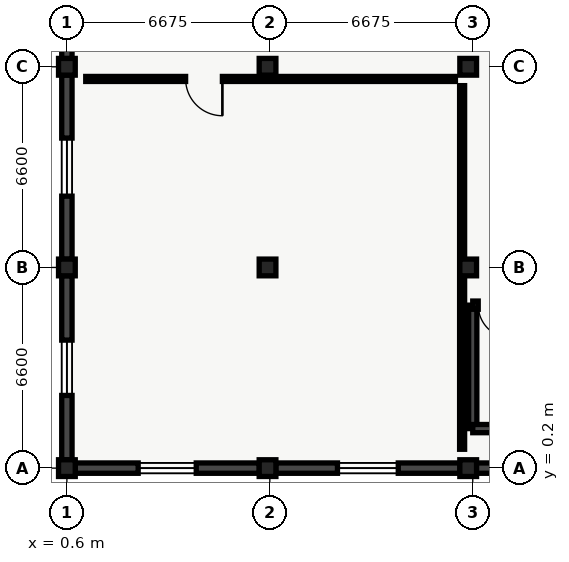
"""IFC4 building model, lengths in metres.
Left out: names, types, materials, properties, quantities, classifications, styles, units other than length and angle.
Written with IfcOpenShell. Run it as: python <this file> out.ifc"""

import sys

from ifc_helpers import new_model, si_unit, direction, frame, frame_2d, origin, origin_2d, place, context, subcontext, project, spatial, polyline, rectangle, outline, extrude, element, fill, save


model = new_model("IFC4")
c1 = context("Model", 3, precision=1e-05, world=origin(), true_north=direction((0.0, 1.0)))
c2 = subcontext(c1, "Body", "Model", "MODEL_VIEW")
j1 = project(units=[si_unit("LENGTHUNIT", "METRE"), si_unit("PLANEANGLEUNIT", "RADIAN")], contexts=[c1])
p1 = place(None, origin())
s1 = spatial("IfcSite", under=j1, at=p1, CompositionType="ELEMENT")
p2 = place(p1, origin())
s2 = spatial("IfcBuilding", under=s1, at=p2, CompositionType="ELEMENT")
p3 = place(p2, frame((0.0, 0.0, 18.6)))
s3 = spatial("IfcBuildingStorey", under=s2, at=p3, CompositionType="ELEMENT", Elevation=18.6)
p4 = place(p3, frame((0.6, 0.2, 0.0), z_axis=(0.0, 0.0, 1.0), x_axis=(1.0, 0.0, 0.0)))
e1 = element("IfcColumn", 1, at=p4, inside=s3, PredefinedType="COLUMN", context=c2, shape_type="SweptSolid", body=[
    extrude(rectangle(XDim=0.55, YDim=0.55, at=origin_2d()), origin(), (0.0, 0.0, 1.0), 4.305),
])
p5 = place(p3, frame((0.6, 6.8, 0.0), z_axis=(0.0, 0.0, 1.0), x_axis=(1.0, 0.0, 0.0)))
e2 = element("IfcColumn", 2, at=p5, inside=s3, PredefinedType="COLUMN", context=c2, shape_type="SweptSolid", body=[
    extrude(rectangle(XDim=0.55, YDim=0.55, at=origin_2d()), origin(), (0.0, 0.0, 1.0), 5.905),
])
p6 = place(p3, frame((0.6, 13.4, 0.0), z_axis=(0.0, 0.0, 1.0), x_axis=(1.0, 0.0, 0.0)))
e3 = element("IfcColumn", 3, at=p6, inside=s3, PredefinedType="COLUMN", context=c2, shape_type="SweptSolid", body=[
    extrude(rectangle(XDim=0.55, YDim=0.55, at=origin_2d()), origin(), (0.0, 0.0, 1.0), 7.505),
])
p7 = place(p3, frame((7.2, 0.2, 0.0), z_axis=(0.0, 0.0, 1.0), x_axis=(1.0, 0.0, 0.0)))
e4 = element("IfcColumn", 4, at=p7, inside=s3, PredefinedType="COLUMN", context=c2, shape_type="SweptSolid", body=[
    extrude(rectangle(XDim=0.55, YDim=0.55, at=origin_2d()), origin(), (0.0, 0.0, 1.0), 4.305),
])
p8 = place(p3, frame((7.2, 6.8, 0.0), z_axis=(0.0, 0.0, 1.0), x_axis=(1.0, 0.0, 0.0)))
e5 = element("IfcColumn", 5, at=p8, inside=s3, PredefinedType="COLUMN", context=c2, shape_type="SweptSolid", body=[
    extrude(rectangle(XDim=0.55, YDim=0.55, at=origin_2d()), origin(), (0.0, 0.0, 1.0), 5.905),
])
p9 = place(p3, frame((7.2, 13.4, 0.0), z_axis=(0.0, 0.0, 1.0), x_axis=(1.0, 0.0, 0.0)))
e6 = element("IfcColumn", 6, at=p9, inside=s3, PredefinedType="COLUMN", context=c2, shape_type="SweptSolid", body=[
    extrude(rectangle(XDim=0.55, YDim=0.55, at=origin_2d()), origin(), (0.0, 0.0, 1.0), 7.505),
])
p10 = place(p3, frame((13.8, 0.2, 0.0), z_axis=(0.0, 0.0, 1.0), x_axis=(1.0, 0.0, 0.0)))
e7 = element("IfcColumn", 7, at=p10, inside=s3, PredefinedType="COLUMN", context=c2, shape_type="SweptSolid", body=[
    extrude(rectangle(XDim=0.55, YDim=0.55, at=origin_2d()), origin(), (0.0, 0.0, 1.0), 4.305),
])
p11 = place(p3, frame((13.8, 6.8, 0.0), z_axis=(0.0, 0.0, 1.0), x_axis=(1.0, 0.0, 0.0)))
e8 = element("IfcColumn", 8, at=p11, inside=s3, PredefinedType="COLUMN", context=c2, shape_type="SweptSolid", body=[
    extrude(rectangle(XDim=0.55, YDim=0.55, at=origin_2d()), origin(), (0.0, 0.0, 1.0), 5.905),
])
p12 = place(p3, frame((13.8, 13.4, 0.0), z_axis=(0.0, 0.0, 1.0), x_axis=(1.0, 0.0, 0.0)))
e9 = element("IfcColumn", 9, at=p12, inside=s3, PredefinedType="COLUMN", context=c2, shape_type="SweptSolid", body=[
    extrude(rectangle(XDim=0.55, YDim=0.55, at=origin_2d()), origin(), (0.0, 0.0, 1.0), 7.505),
])
p13 = place(p3, frame((0.6, 0.47, 0.0), z_axis=(0.0, 0.0, 1.0), x_axis=(0.0, 1.0, 0.0)))
e10 = element("IfcWall", 10, at=p13, inside=s3, PredefinedType="SOLIDWALL", context=c2, shape_type="SweptSolid", body=[
    extrude(outline(polyline([(0.0, 0.0), (6.06, 0.0), (6.06, 5.784), (0.0, 4.315), (0.0, 0.0)])), frame((0.0, 0.17, 0.0), z_axis=(0.0, -1.0, 0.0), x_axis=(1.0, 0.0, 0.0)), (0.0, 0.0, 1.0), 0.34),
])
p14 = place(p13, frame((2.12, 0.0, 0.95)))
e11 = element("IfcOpeningElement", 11, at=p14, cuts=e10, PredefinedType="OPENING", context=c2, shape_type="SweptSolid", body=[
    extrude(rectangle(XDim=1.82, YDim=1.38, at=frame_2d((0.91, 0.69))), frame((0.0, 0.17, 0.0), z_axis=(0.0, -1.0, 0.0), x_axis=(1.0, 0.0, 0.0)), (0.0, 0.0, 1.0), 0.34),
])
p15 = place(p3, frame((0.6, 7.07, 0.0), z_axis=(0.0, 0.0, 1.0), x_axis=(0.0, 1.0, 0.0)))
e12 = element("IfcWall", 12, at=p15, inside=s3, PredefinedType="SOLIDWALL", context=c2, shape_type="SweptSolid", body=[
    extrude(outline(polyline([(0.0, 0.0), (6.06, 0.0), (6.06, 7.385), (0.0, 5.915), (0.0, 0.0)])), frame((0.0, 0.17, 0.0), z_axis=(0.0, -1.0, 0.0), x_axis=(1.0, 0.0, 0.0)), (0.0, 0.0, 1.0), 0.34),
])
p16 = place(p15, frame((2.075, 0.0, 0.95)))
e13 = element("IfcOpeningElement", 13, at=p16, cuts=e12, PredefinedType="OPENING", context=c2, shape_type="SweptSolid", body=[
    extrude(rectangle(XDim=1.91, YDim=1.4, at=frame_2d((0.955, 0.7))), frame((0.0, 0.17, 0.0), z_axis=(0.0, -1.0, 0.0), x_axis=(1.0, 0.0, 0.0)), (0.0, 0.0, 1.0), 0.34),
])
p17 = place(p3, frame((0.6, 13.67, 0.0), z_axis=(0.0, 0.0, 1.0), x_axis=(0.0, 1.0, 0.0)))
e14 = element("IfcWall", 14, at=p17, inside=s3, PredefinedType="SOLIDWALL", context=c2, shape_type="SweptSolid", body=[
    extrude(outline(polyline([(0.0, 0.0), (6.06, 0.0), (6.06, 8.984), (0.0, 7.515), (0.0, 0.0)])), frame((0.0, 0.17, 0.0), z_axis=(0.0, -1.0, 0.0), x_axis=(1.0, 0.0, 0.0)), (0.0, 0.0, 1.0), 0.34),
])
p18 = place(p17, frame((2.03, 0.0, 0.95)))
e15 = element("IfcOpeningElement", 15, at=p18, cuts=e14, PredefinedType="OPENING", context=c2, shape_type="SweptSolid", body=[
    extrude(rectangle(XDim=2.0, YDim=1.42, at=frame_2d((1.0, 0.71))), frame((0.0, 0.17, 0.0), z_axis=(0.0, -1.0, 0.0), x_axis=(1.0, 0.0, 0.0)), (0.0, 0.0, 1.0), 0.34),
])
p19 = place(p3, frame((20.13, 0.2, 0.0), z_axis=(0.0, 0.0, 1.0), x_axis=(-1.0, 0.0, 0.0)))
e16 = element("IfcWall", 16, at=p19, inside=s3, PredefinedType="SOLIDWALL", context=c2, shape_type="SweptSolid", body=[
    extrude(rectangle(XDim=6.06, YDim=0.34, at=frame_2d((3.03, 0.0))), origin(), (0.0, 0.0, 1.0), 4.28),
])
p20 = place(p3, frame((13.53, 0.2, 0.0), z_axis=(0.0, 0.0, 1.0), x_axis=(-1.0, 0.0, 0.0)))
e17 = element("IfcWall", 17, at=p20, inside=s3, PredefinedType="SOLIDWALL", context=c2, shape_type="SweptSolid", body=[
    extrude(rectangle(XDim=6.06, YDim=0.34, at=frame_2d((3.03, 0.0))), origin(), (0.0, 0.0, 1.0), 4.28),
])
p21 = place(p20, frame((2.03, 0.0, 0.95)))
e18 = element("IfcOpeningElement", 18, at=p21, cuts=e17, PredefinedType="OPENING", context=c2, shape_type="SweptSolid", body=[
    extrude(rectangle(XDim=2.0, YDim=1.42, at=frame_2d((1.0, 0.71))), frame((0.0, 0.17, 0.0), z_axis=(0.0, -1.0, 0.0), x_axis=(1.0, 0.0, 0.0)), (0.0, 0.0, 1.0), 0.34),
])
p22 = place(p3, frame((6.93, 0.2, 0.0), z_axis=(0.0, 0.0, 1.0), x_axis=(-1.0, 0.0, 0.0)))
e19 = element("IfcWall", 19, at=p22, inside=s3, PredefinedType="SOLIDWALL", context=c2, shape_type="SweptSolid", body=[
    extrude(rectangle(XDim=6.06, YDim=0.34, at=frame_2d((3.03, 0.0))), origin(), (0.0, 0.0, 1.0), 4.28),
])
p23 = place(p22, frame((2.075, 0.0, 0.95)))
e20 = element("IfcOpeningElement", 20, at=p23, cuts=e19, PredefinedType="OPENING", context=c2, shape_type="SweptSolid", body=[
    extrude(rectangle(XDim=1.91, YDim=1.4, at=frame_2d((0.955, 0.7))), frame((0.0, 0.17, 0.0), z_axis=(0.0, -1.0, 0.0), x_axis=(1.0, 0.0, 0.0)), (0.0, 0.0, 1.0), 0.34),
])
p24 = place(p3, frame((13.95, 1.5, 0.0), z_axis=(0.0, 0.0, 1.0), x_axis=(0.0, 1.0, 0.0)))
e21 = element("IfcWall", 21, at=p24, inside=s3, PredefinedType="SHEAR", context=c2, shape_type="SweptSolid", body=[
    extrude(rectangle(XDim=4.06, YDim=0.27, at=frame_2d((2.03, 0.0))), origin(), (0.0, 0.0, 1.0), 4.25),
])
p25 = place(p3, frame((13.95, 5.56, 0.0), z_axis=(0.0, 0.0, 1.0), x_axis=(1.0, 0.0, 0.0)))
e22 = element("IfcWall", 22, at=p25, inside=s3, PredefinedType="SHEAR", context=c2, shape_type="SweptSolid", body=[
    extrude(rectangle(XDim=7.47, YDim=0.27, at=frame_2d((3.735, 0.0))), origin(), (0.0, 0.0, 1.0), 4.25),
])
p26 = place(p25, frame((0.18, 0.0, 0.0)))
e23 = element("IfcOpeningElement", 23, at=p26, cuts=e22, PredefinedType="OPENING", context=c2, shape_type="SweptSolid", body=[
    extrude(rectangle(XDim=1.08, YDim=2.15, at=frame_2d((0.54, 1.075))), frame((0.0, 0.135, 0.0), z_axis=(0.0, -1.0, 0.0), x_axis=(1.0, 0.0, 0.0)), (0.0, 0.0, 1.0), 0.27),
])
p27 = place(p3, frame((21.42, 1.5, 0.0), z_axis=(0.0, 0.0, 1.0), x_axis=(-1.0, 0.0, 0.0)))
e24 = element("IfcWall", 24, at=p27, inside=s3, PredefinedType="SHEAR", context=c2, shape_type="SweptSolid", body=[
    extrude(rectangle(XDim=7.47, YDim=0.27, at=frame_2d((3.735, 0.0))), origin(), (0.0, 0.0, 1.0), 4.25),
])
p28 = place(p3, frame((13.6, 0.82, 0.0), z_axis=(0.0, 0.0, 1.0), x_axis=(0.0, 1.0, 0.0)))
e25 = element("IfcWall", 25, at=p28, inside=s3, PredefinedType="PARTITIONING", context=c2, shape_type="SweptSolid", body=[
    extrude(rectangle(XDim=11.96, YDim=0.165, at=frame_2d((5.98, 0.0))), origin(), (0.0, 0.0, 1.0), 3.69),
])
p29 = place(p3, frame((13.38, 13.0, 0.0), z_axis=(0.0, 0.0, 1.0), x_axis=(-1.0, 0.0, 0.0)))
e26 = element("IfcWall", 26, at=p29, inside=s3, PredefinedType="PARTITIONING", context=c2, shape_type="SweptSolid", body=[
    extrude(rectangle(XDim=12.16, YDim=0.165, at=frame_2d((6.08, 0.0))), origin(), (0.0, 0.0, 1.0), 3.95),
])
p30 = place(p29, frame((7.665, 0.0, 0.0)))
e27 = element("IfcOpeningElement", 27, at=p30, cuts=e26, PredefinedType="OPENING", context=c2, shape_type="SweptSolid", body=[
    extrude(rectangle(XDim=1.21, YDim=2.16, at=frame_2d((0.605, 1.08))), frame((0.0, 0.083, 0.0), z_axis=(0.0, -1.0, 0.0), x_axis=(1.0, 0.0, 0.0)), (0.0, 0.0, 1.0), 0.165),
])
p31 = place(p14, origin())
e28 = element("IfcWindow", 28, at=p31, inside=s3, PartitioningType="SINGLE_PANEL", PredefinedType="WINDOW", context=c2, shape_type="SweptSolid", body=[
    extrude(rectangle(XDim=1.82, YDim=1.38, at=frame_2d((0.91, 0.69))), frame((0.0, 0.03, 0.0), z_axis=(0.0, -1.0, 0.0), x_axis=(1.0, 0.0, 0.0)), (0.0, 0.0, 1.0), 0.06),
])
fill(e11, e28)
p32 = place(p16, origin())
e29 = element("IfcWindow", 29, at=p32, inside=s3, PartitioningType="SINGLE_PANEL", PredefinedType="WINDOW", context=c2, shape_type="SweptSolid", body=[
    extrude(rectangle(XDim=1.91, YDim=1.4, at=frame_2d((0.955, 0.7))), frame((0.0, 0.03, 0.0), z_axis=(0.0, -1.0, 0.0), x_axis=(1.0, 0.0, 0.0)), (0.0, 0.0, 1.0), 0.06),
])
fill(e13, e29)
p33 = place(p21, origin())
e30 = element("IfcWindow", 30, at=p33, inside=s3, PartitioningType="SINGLE_PANEL", PredefinedType="WINDOW", context=c2, shape_type="SweptSolid", body=[
    extrude(rectangle(XDim=2.0, YDim=1.42, at=frame_2d((1.0, 0.71))), frame((0.0, 0.03, 0.0), z_axis=(0.0, -1.0, 0.0), x_axis=(1.0, 0.0, 0.0)), (0.0, 0.0, 1.0), 0.06),
])
fill(e18, e30)
p34 = place(p23, origin())
e31 = element("IfcWindow", 31, at=p34, inside=s3, PartitioningType="SINGLE_PANEL", PredefinedType="WINDOW", context=c2, shape_type="SweptSolid", body=[
    extrude(rectangle(XDim=1.91, YDim=1.4, at=frame_2d((0.955, 0.7))), frame((0.0, 0.03, 0.0), z_axis=(0.0, -1.0, 0.0), x_axis=(1.0, 0.0, 0.0)), (0.0, 0.0, 1.0), 0.06),
])
fill(e20, e31)
p35 = place(p26, origin())
e32 = element("IfcDoor", 32, at=p35, inside=s3, OperationType="SINGLE_SWING_RIGHT", PredefinedType="DOOR", context=c2, shape_type="SweptSolid", body=[
    extrude(rectangle(XDim=1.08, YDim=2.15, at=frame_2d((0.54, 1.075))), frame((0.0, 0.025, 0.0), z_axis=(0.0, -1.0, 0.0), x_axis=(1.0, 0.0, 0.0)), (0.0, 0.0, 1.0), 0.05),
])
fill(e23, e32)
p36 = place(p30, origin())
e33 = element("IfcDoor", 33, at=p36, inside=s3, OperationType="SINGLE_SWING_LEFT", PredefinedType="DOOR", context=c2, shape_type="SweptSolid", body=[
    extrude(rectangle(XDim=1.21, YDim=2.16, at=frame_2d((0.605, 1.08))), frame((0.0, 0.025, 0.0), z_axis=(0.0, -1.0, 0.0), x_axis=(1.0, 0.0, 0.0)), (0.0, 0.0, 1.0), 0.05),
])
fill(e27, e33)
save(model, sys.argv[1])
